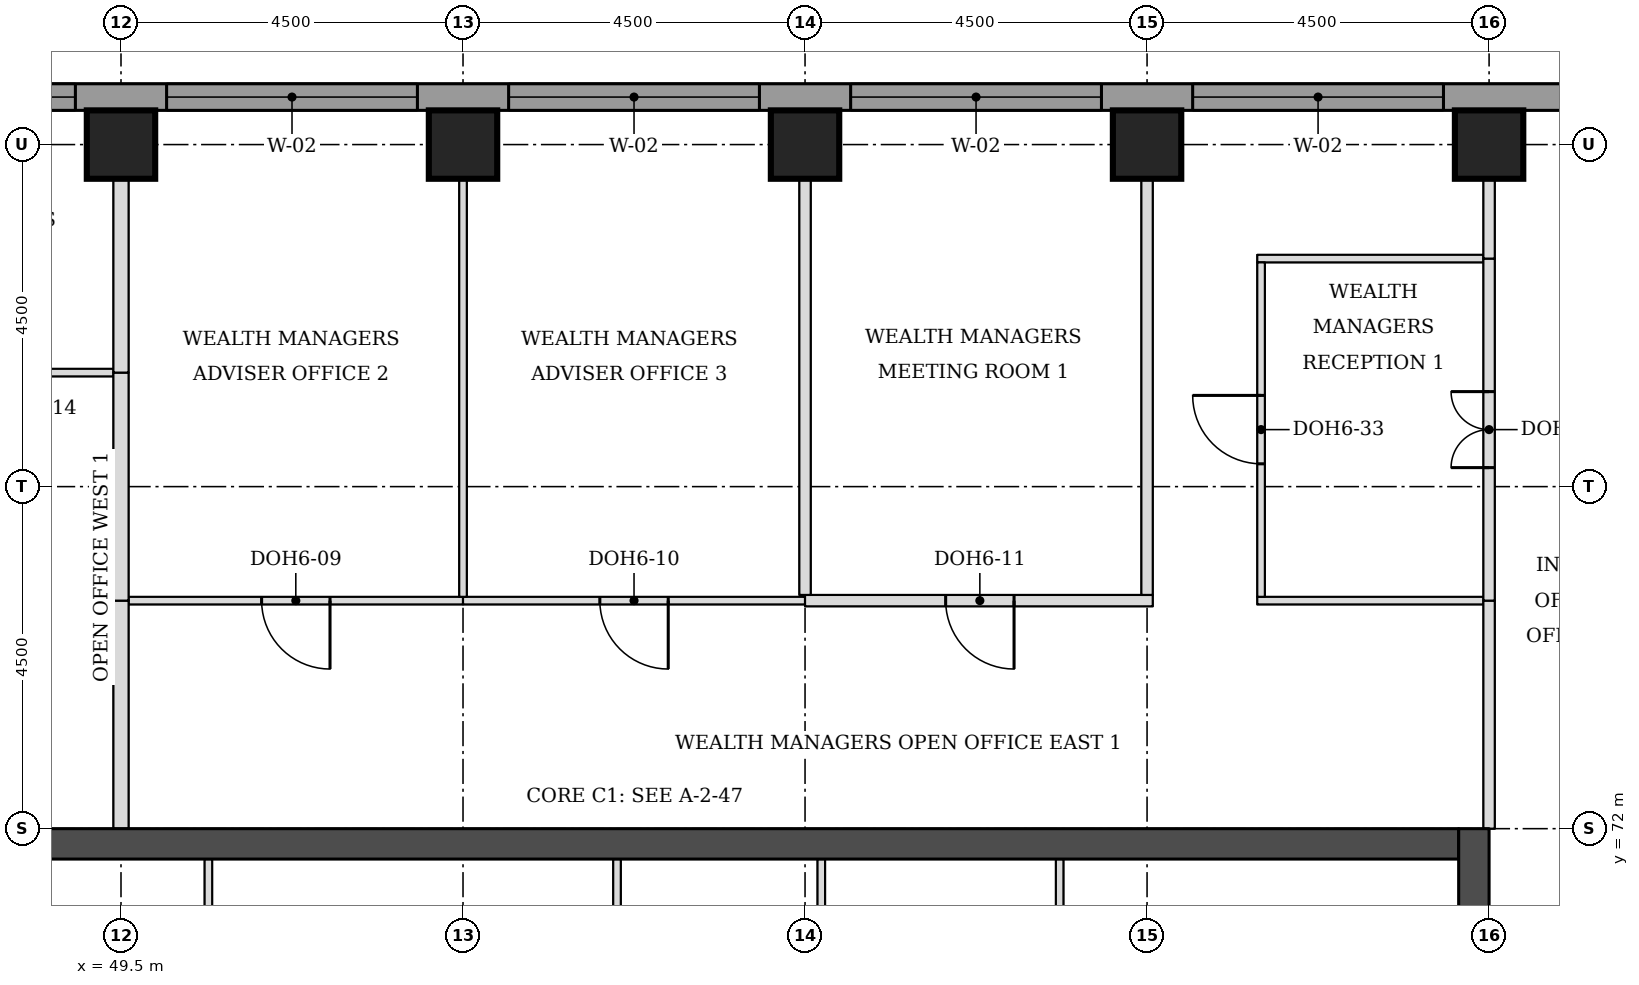
"""IFC4 building model, lengths in metres.
Left out: names, types, materials, properties, quantities, classifications, styles, units other than length and angle.
Written with IfcOpenShell. Run it as: python <this file> out.ifc"""

import sys

from ifc_helpers import new_model, si_unit, direction, frame, frame_2d, origin, origin_2d, place, context, subcontext, project, spatial, rectangle, extrude, element, fill, save


model = new_model("IFC4")
c1 = context("Model", 3, precision=1e-05, world=origin(), true_north=direction((0.0, 1.0)))
c2 = subcontext(c1, "Body", "Model", "MODEL_VIEW")
j1 = project(units=[si_unit("LENGTHUNIT", "METRE"), si_unit("PLANEANGLEUNIT", "RADIAN")], contexts=[c1])
p1 = place(None, origin())
s1 = spatial("IfcSite", under=j1, at=p1, CompositionType="ELEMENT")
p2 = place(p1, origin())
s2 = spatial("IfcBuilding", under=s1, at=p2, CompositionType="ELEMENT")
p3 = place(p2, frame((0.0, 0.0, 188.4)))
s3 = spatial("IfcBuildingStorey", under=s2, at=p3, CompositionType="ELEMENT", Elevation=188.4)
for number, where, z_axis, x_axis in (
    (1, (49.5, 81.0, 0.0), (0.0, 0.0, 1.0), (1.0, 0.0, 0.0)),
    (2, (54.0, 81.0, 0.0), (0.0, 0.0, 1.0), (1.0, 0.0, 0.0)),
    (3, (58.5, 81.0, 0.0), (0.0, 0.0, 1.0), (1.0, 0.0, 0.0)),
    (4, (63.0, 81.0, 0.0), (0.0, 0.0, 1.0), (1.0, 0.0, 0.0)),
    (5, (67.5, 81.0, 0.0), (0.0, 0.0, 1.0), (1.0, 0.0, 0.0)),
):
    element("IfcColumn", number, at=place(p3, frame(where, z_axis=z_axis, x_axis=x_axis)), inside=s3, PredefinedType="COLUMN", context=c2, shape_type="SweptSolid", body=[
        extrude(rectangle(XDim=0.9, YDim=0.9, at=origin_2d()), origin(), (0.0, 0.0, 1.0), 3.7),
    ])
p4 = place(p3, frame((45.4, 71.8, 0.0), z_axis=(0.0, 0.0, 1.0), x_axis=(1.0, 0.0, 0.0)))
e6 = element("IfcWall", 6, at=p4, inside=s3, PredefinedType="SHEAR", context=c2, shape_type="SweptSolid", body=[
    extrude(rectangle(XDim=21.7, YDim=0.4, at=frame_2d((10.85, 0.0))), origin(), (0.0, 0.0, 1.0), 3.7),
])
p5 = place(p3, frame((67.3, 49.5, 0.0), z_axis=(0.0, 0.0, 1.0), x_axis=(0.0, 1.0, 0.0)))
e7 = element("IfcWall", 7, at=p5, inside=s3, PredefinedType="SHEAR", context=c2, shape_type="SweptSolid", body=[
    extrude(rectangle(XDim=22.5, YDim=0.4, at=frame_2d((11.25, 0.0))), origin(), (0.0, 0.0, 1.0), 3.7),
])
p6 = place(p5, frame((4.2, 0.0, 0.0)))
e8 = element("IfcOpeningElement", 8, at=p6, cuts=e7, PredefinedType="OPENING", context=c2, shape_type="SweptSolid", body=[
    extrude(rectangle(XDim=1.8, YDim=2.1, at=frame_2d((0.9, 1.05))), frame((0.0, 0.21, 0.0), z_axis=(0.0, -1.0, 0.0), x_axis=(1.0, 0.0, 0.0)), (0.0, 0.0, 1.0), 0.42),
])
p7 = place(p5, frame((6.9, 0.0, 0.0)))
e9 = element("IfcOpeningElement", 9, at=p7, cuts=e7, PredefinedType="OPENING", context=c2, shape_type="SweptSolid", body=[
    extrude(rectangle(XDim=1.1, YDim=2.1, at=frame_2d((0.55, 1.05))), frame((0.0, 0.21, 0.0), z_axis=(0.0, -1.0, 0.0), x_axis=(1.0, 0.0, 0.0)), (0.0, 0.0, 1.0), 0.42),
])
p8 = place(p5, frame((13.6, 0.0, 0.0)))
e10 = element("IfcOpeningElement", 10, at=p8, cuts=e7, PredefinedType="OPENING", context=c2, shape_type="SweptSolid", body=[
    extrude(rectangle(XDim=1.1, YDim=2.1, at=frame_2d((0.55, 1.05))), frame((0.0, 0.21, 0.0), z_axis=(0.0, -1.0, 0.0), x_axis=(1.0, 0.0, 0.0)), (0.0, 0.0, 1.0), 0.42),
])
p9 = place(p5, frame((16.5, 0.0, 0.0)))
e11 = element("IfcOpeningElement", 11, at=p9, cuts=e7, PredefinedType="OPENING", context=c2, shape_type="SweptSolid", body=[
    extrude(rectangle(XDim=1.8, YDim=2.1, at=frame_2d((0.9, 1.05))), frame((0.0, 0.21, 0.0), z_axis=(0.0, -1.0, 0.0), x_axis=(1.0, 0.0, 0.0)), (0.0, 0.0, 1.0), 0.42),
])
p10 = place(p3, frame((72.331, 81.625, 0.0), z_axis=(0.0, 0.0, 1.0), x_axis=(-1.0, 0.0, 0.0)))
e12 = element("IfcWall", 12, at=p10, inside=s3, PredefinedType="STANDARD", context=c2, shape_type="SweptSolid", body=[
    extrude(rectangle(XDim=32.163, YDim=0.35, at=frame_2d((16.081, 0.0))), origin(), (0.0, 0.0, 1.0), 3.525),
])
p11 = place(p10, frame((5.431, 0.0, 0.9)))
e13 = element("IfcOpeningElement", 13, at=p11, cuts=e12, PredefinedType="OPENING", context=c2, shape_type="SweptSolid", body=[
    extrude(rectangle(XDim=3.3, YDim=1.9, at=frame_2d((1.65, 0.95))), frame((0.0, 0.185, 0.0), z_axis=(0.0, -1.0, 0.0), x_axis=(1.0, 0.0, 0.0)), (0.0, 0.0, 1.0), 0.37),
])
p12 = place(p10, frame((9.931, 0.0, 0.9)))
e14 = element("IfcOpeningElement", 14, at=p12, cuts=e12, PredefinedType="OPENING", context=c2, shape_type="SweptSolid", body=[
    extrude(rectangle(XDim=3.3, YDim=1.9, at=frame_2d((1.65, 0.95))), frame((0.0, 0.185, 0.0), z_axis=(0.0, -1.0, 0.0), x_axis=(1.0, 0.0, 0.0)), (0.0, 0.0, 1.0), 0.37),
])
p13 = place(p10, frame((14.431, 0.0, 0.9)))
e15 = element("IfcOpeningElement", 15, at=p13, cuts=e12, PredefinedType="OPENING", context=c2, shape_type="SweptSolid", body=[
    extrude(rectangle(XDim=3.3, YDim=1.9, at=frame_2d((1.65, 0.95))), frame((0.0, 0.185, 0.0), z_axis=(0.0, -1.0, 0.0), x_axis=(1.0, 0.0, 0.0)), (0.0, 0.0, 1.0), 0.37),
])
p14 = place(p10, frame((18.931, 0.0, 0.9)))
e16 = element("IfcOpeningElement", 16, at=p14, cuts=e12, PredefinedType="OPENING", context=c2, shape_type="SweptSolid", body=[
    extrude(rectangle(XDim=3.3, YDim=1.9, at=frame_2d((1.65, 0.95))), frame((0.0, 0.185, 0.0), z_axis=(0.0, -1.0, 0.0), x_axis=(1.0, 0.0, 0.0)), (0.0, 0.0, 1.0), 0.37),
])
p15 = place(p10, frame((23.431, 0.0, 0.9)))
e17 = element("IfcOpeningElement", 17, at=p15, cuts=e12, PredefinedType="OPENING", context=c2, shape_type="SweptSolid", body=[
    extrude(rectangle(XDim=3.3, YDim=1.9, at=frame_2d((1.65, 0.95))), frame((0.0, 0.185, 0.0), z_axis=(0.0, -1.0, 0.0), x_axis=(1.0, 0.0, 0.0)), (0.0, 0.0, 1.0), 0.37),
])
p16 = place(p3, frame((49.6, 75.0, 0.0), z_axis=(0.0, 0.0, 1.0), x_axis=(1.0, 0.0, 0.0)))
e18 = element("IfcWall", 18, at=p16, inside=s3, PredefinedType="PARTITIONING", context=c2, shape_type="SweptSolid", body=[
    extrude(rectangle(XDim=4.4, YDim=0.1, at=frame_2d((2.2, 0.0))), origin(), (0.0, 0.0, 1.0), 3.55),
])
p17 = place(p16, frame((1.75, 0.0, 0.0)))
e19 = element("IfcOpeningElement", 19, at=p17, cuts=e18, PredefinedType="OPENING", context=c2, shape_type="SweptSolid", body=[
    extrude(rectangle(XDim=0.9, YDim=2.1, at=frame_2d((0.45, 1.05))), frame((0.0, 0.06, 0.0), z_axis=(0.0, -1.0, 0.0), x_axis=(1.0, 0.0, 0.0)), (0.0, 0.0, 1.0), 0.12),
])
p18 = place(p3, frame((54.0, 75.0, 0.0), z_axis=(0.0, 0.0, 1.0), x_axis=(1.0, 0.0, 0.0)))
e20 = element("IfcWall", 20, at=p18, inside=s3, PredefinedType="PARTITIONING", context=c2, shape_type="SweptSolid", body=[
    extrude(rectangle(XDim=4.5, YDim=0.1, at=frame_2d((2.25, 0.0))), origin(), (0.0, 0.0, 1.0), 3.55),
])
p19 = place(p18, frame((1.8, 0.0, 0.0)))
e21 = element("IfcOpeningElement", 21, at=p19, cuts=e20, PredefinedType="OPENING", context=c2, shape_type="SweptSolid", body=[
    extrude(rectangle(XDim=0.9, YDim=2.1, at=frame_2d((0.45, 1.05))), frame((0.0, 0.06, 0.0), z_axis=(0.0, -1.0, 0.0), x_axis=(1.0, 0.0, 0.0)), (0.0, 0.0, 1.0), 0.12),
])
p20 = place(p3, frame((58.5, 75.0, 0.0), z_axis=(0.0, 0.0, 1.0), x_axis=(1.0, 0.0, 0.0)))
e22 = element("IfcWall", 22, at=p20, inside=s3, PredefinedType="PARTITIONING", context=c2, shape_type="SweptSolid", body=[
    extrude(rectangle(XDim=4.575, YDim=0.15, at=frame_2d((2.288, 0.0))), origin(), (0.0, 0.0, 1.0), 3.55),
])
p21 = place(p20, frame((1.85, 0.0, 0.0)))
e23 = element("IfcOpeningElement", 23, at=p21, cuts=e22, PredefinedType="OPENING", context=c2, shape_type="SweptSolid", body=[
    extrude(rectangle(XDim=0.9, YDim=2.1, at=frame_2d((0.45, 1.05))), frame((0.0, 0.085, 0.0), z_axis=(0.0, -1.0, 0.0), x_axis=(1.0, 0.0, 0.0)), (0.0, 0.0, 1.0), 0.17),
])
p22 = place(p3, frame((64.45, 75.0, 0.0), z_axis=(0.0, 0.0, 1.0), x_axis=(1.0, 0.0, 0.0)))
e24 = element("IfcWall", 24, at=p22, inside=s3, PredefinedType="PARTITIONING", context=c2, shape_type="SweptSolid", body=[
    extrude(rectangle(XDim=2.975, YDim=0.1, at=frame_2d((1.488, 0.0))), origin(), (0.0, 0.0, 1.0), 3.55),
])
p23 = place(p3, frame((45.075, 78.0, 0.0), z_axis=(0.0, 0.0, 1.0), x_axis=(1.0, 0.0, 0.0)))
e25 = element("IfcWall", 25, at=p23, inside=s3, PredefinedType="PARTITIONING", context=c2, shape_type="SweptSolid", body=[
    extrude(rectangle(XDim=4.325, YDim=0.1, at=frame_2d((2.163, 0.0))), origin(), (0.0, 0.0, 1.0), 3.55),
])
p24 = place(p23, frame((1.95, 0.0, 0.0)))
e26 = element("IfcOpeningElement", 26, at=p24, cuts=e25, PredefinedType="OPENING", context=c2, shape_type="SweptSolid", body=[
    extrude(rectangle(XDim=0.9, YDim=2.1, at=frame_2d((0.45, 1.05))), frame((0.0, 0.06, 0.0), z_axis=(0.0, -1.0, 0.0), x_axis=(1.0, 0.0, 0.0)), (0.0, 0.0, 1.0), 0.12),
])
p25 = place(p3, frame((64.45, 79.5, 0.0), z_axis=(0.0, 0.0, 1.0), x_axis=(1.0, 0.0, 0.0)))
e27 = element("IfcWall", 27, at=p25, inside=s3, PredefinedType="PARTITIONING", context=c2, shape_type="SweptSolid", body=[
    extrude(rectangle(XDim=2.975, YDim=0.1, at=frame_2d((1.488, 0.0))), origin(), (0.0, 0.0, 1.0), 3.55),
])
p26 = place(p3, frame((49.5, 72.0, 0.0), z_axis=(0.0, 0.0, 1.0), x_axis=(0.0, 1.0, 0.0)))
e28 = element("IfcWall", 28, at=p26, inside=s3, PredefinedType="PARTITIONING", context=c2, shape_type="SweptSolid", body=[
    extrude(rectangle(XDim=3.0, YDim=0.2, at=frame_2d((1.5, 0.0))), origin(), (0.0, 0.0, 1.0), 3.55),
])
p27 = place(p3, frame((67.5, 72.0, 0.0), z_axis=(0.0, 0.0, 1.0), x_axis=(0.0, 1.0, 0.0)))
e29 = element("IfcWall", 29, at=p27, inside=s3, PredefinedType="PARTITIONING", context=c2, shape_type="SweptSolid", body=[
    extrude(rectangle(XDim=3.0, YDim=0.15, at=frame_2d((1.5, 0.0))), origin(), (0.0, 0.0, 1.0), 3.022),
])
p28 = place(p3, frame((49.5, 75.0, 0.0), z_axis=(0.0, 0.0, 1.0), x_axis=(0.0, 1.0, 0.0)))
e30 = element("IfcWall", 30, at=p28, inside=s3, PredefinedType="PARTITIONING", context=c2, shape_type="SweptSolid", body=[
    extrude(rectangle(XDim=3.0, YDim=0.2, at=frame_2d((1.5, 0.0))), origin(), (0.0, 0.0, 1.0), 3.55),
])
p29 = place(p3, frame((67.5, 75.0, 0.0), z_axis=(0.0, 0.0, 1.0), x_axis=(0.0, 1.0, 0.0)))
e31 = element("IfcWall", 31, at=p29, inside=s3, PredefinedType="PARTITIONING", context=c2, shape_type="SweptSolid", body=[
    extrude(rectangle(XDim=4.5, YDim=0.15, at=frame_2d((2.25, 0.0))), origin(), (0.0, 0.0, 1.0), 3.022),
])
p30 = place(p29, frame((1.75, 0.0, 0.0)))
e32 = element("IfcOpeningElement", 32, at=p30, cuts=e31, PredefinedType="OPENING", context=c2, shape_type="SweptSolid", body=[
    extrude(rectangle(XDim=1.0, YDim=2.1, at=frame_2d((0.5, 1.05))), frame((0.0, 0.085, 0.0), z_axis=(0.0, -1.0, 0.0), x_axis=(1.0, 0.0, 0.0)), (0.0, 0.0, 1.0), 0.17),
])
p31 = place(p3, frame((54.0, 75.05, 0.0), z_axis=(0.0, 0.0, 1.0), x_axis=(0.0, 1.0, 0.0)))
e33 = element("IfcWall", 33, at=p31, inside=s3, PredefinedType="PARTITIONING", context=c2, shape_type="SweptSolid", body=[
    extrude(rectangle(XDim=6.4, YDim=0.1, at=frame_2d((3.2, 0.0))), origin(), (0.0, 0.0, 1.0), 3.55),
])
p32 = place(p3, frame((64.5, 75.05, 0.0), z_axis=(0.0, 0.0, 1.0), x_axis=(0.0, 1.0, 0.0)))
e34 = element("IfcWall", 34, at=p32, inside=s3, PredefinedType="PARTITIONING", context=c2, shape_type="SweptSolid", body=[
    extrude(rectangle(XDim=4.4, YDim=0.1, at=frame_2d((2.2, 0.0))), origin(), (0.0, 0.0, 1.0), 3.55),
])
p33 = place(p32, frame((1.75, 0.0, 0.0)))
e35 = element("IfcOpeningElement", 35, at=p33, cuts=e34, PredefinedType="OPENING", context=c2, shape_type="SweptSolid", body=[
    extrude(rectangle(XDim=0.9, YDim=2.1, at=frame_2d((0.45, 1.05))), frame((0.0, 0.06, 0.0), z_axis=(0.0, -1.0, 0.0), x_axis=(1.0, 0.0, 0.0)), (0.0, 0.0, 1.0), 0.12),
])
for number, where, z_axis, x_axis in (
    (36, (58.5, 75.075, 0.0), (0.0, 0.0, 1.0), (0.0, 1.0, 0.0)),
    (37, (63.0, 75.075, 0.0), (0.0, 0.0, 1.0), (0.0, 1.0, 0.0)),
):
    element("IfcWall", number, at=place(p3, frame(where, z_axis=z_axis, x_axis=x_axis)), inside=s3, PredefinedType="PARTITIONING", context=c2, shape_type="SweptSolid", body=[
        extrude(rectangle(XDim=6.375, YDim=0.15, at=frame_2d((3.188, 0.0))), origin(), (0.0, 0.0, 1.0), 3.55),
    ])
p34 = place(p3, frame((49.5, 78.0, 0.0), z_axis=(0.0, 0.0, 1.0), x_axis=(0.0, 1.0, 0.0)))
e38 = element("IfcWall", 38, at=p34, inside=s3, PredefinedType="PARTITIONING", context=c2, shape_type="SweptSolid", body=[
    extrude(rectangle(XDim=3.45, YDim=0.2, at=frame_2d((1.725, 0.0))), origin(), (0.0, 0.0, 1.0), 3.55),
])
p35 = place(p3, frame((67.5, 79.5, 0.0), z_axis=(0.0, 0.0, 1.0), x_axis=(0.0, 1.0, 0.0)))
e39 = element("IfcWall", 39, at=p35, inside=s3, PredefinedType="PARTITIONING", context=c2, shape_type="SweptSolid", body=[
    extrude(rectangle(XDim=1.95, YDim=0.15, at=frame_2d((0.975, 0.0))), origin(), (0.0, 0.0, 1.0), 3.022),
])
for number, where, z_axis, x_axis in (
    (40, (50.65, 68.5, 0.0), (0.0, 0.0, 1.0), (0.0, 1.0, 0.0)),
    (41, (56.026, 68.5, 0.0), (0.0, 0.0, 1.0), (0.0, 1.0, 0.0)),
    (42, (58.714, 68.5, 0.0), (0.0, 0.0, 1.0), (0.0, 1.0, 0.0)),
    (43, (61.85, 68.5, 0.0), (0.0, 0.0, 1.0), (0.0, 1.0, 0.0)),
):
    element("IfcWall", number, at=place(p3, frame(where, z_axis=z_axis, x_axis=x_axis)), inside=s3, PredefinedType="PARTITIONING", context=c2, shape_type="SweptSolid", body=[
        extrude(rectangle(XDim=3.1, YDim=0.1, at=frame_2d((1.55, 0.0))), origin(), (0.0, 0.0, 1.0), 3.55),
    ])
p36 = place(p11, origin())
e44 = element("IfcWindow", 44, at=p36, inside=s3, PartitioningType="SINGLE_PANEL", PredefinedType="WINDOW", context=c2, shape_type="SweptSolid", body=[
    extrude(rectangle(XDim=3.3, YDim=1.9, at=frame_2d((1.65, 0.95))), frame((0.0, 0.085, 0.0), z_axis=(0.0, -1.0, 0.0), x_axis=(1.0, 0.0, 0.0)), (0.0, 0.0, 1.0), 0.06),
])
fill(e13, e44)
p37 = place(p12, origin())
e45 = element("IfcWindow", 45, at=p37, inside=s3, PartitioningType="SINGLE_PANEL", PredefinedType="WINDOW", context=c2, shape_type="SweptSolid", body=[
    extrude(rectangle(XDim=3.3, YDim=1.9, at=frame_2d((1.65, 0.95))), frame((0.0, 0.085, 0.0), z_axis=(0.0, -1.0, 0.0), x_axis=(1.0, 0.0, 0.0)), (0.0, 0.0, 1.0), 0.06),
])
fill(e14, e45)
p38 = place(p13, origin())
e46 = element("IfcWindow", 46, at=p38, inside=s3, PartitioningType="SINGLE_PANEL", PredefinedType="WINDOW", context=c2, shape_type="SweptSolid", body=[
    extrude(rectangle(XDim=3.3, YDim=1.9, at=frame_2d((1.65, 0.95))), frame((0.0, 0.085, 0.0), z_axis=(0.0, -1.0, 0.0), x_axis=(1.0, 0.0, 0.0)), (0.0, 0.0, 1.0), 0.06),
])
fill(e15, e46)
p39 = place(p14, origin())
e47 = element("IfcWindow", 47, at=p39, inside=s3, PartitioningType="SINGLE_PANEL", PredefinedType="WINDOW", context=c2, shape_type="SweptSolid", body=[
    extrude(rectangle(XDim=3.3, YDim=1.9, at=frame_2d((1.65, 0.95))), frame((0.0, 0.085, 0.0), z_axis=(0.0, -1.0, 0.0), x_axis=(1.0, 0.0, 0.0)), (0.0, 0.0, 1.0), 0.06),
])
fill(e16, e47)
p40 = place(p15, origin())
e48 = element("IfcWindow", 48, at=p40, inside=s3, PartitioningType="SINGLE_PANEL", PredefinedType="WINDOW", context=c2, shape_type="SweptSolid", body=[
    extrude(rectangle(XDim=3.3, YDim=1.9, at=frame_2d((1.65, 0.95))), frame((0.0, 0.085, 0.0), z_axis=(0.0, -1.0, 0.0), x_axis=(1.0, 0.0, 0.0)), (0.0, 0.0, 1.0), 0.06),
])
fill(e17, e48)
p41 = place(p30, origin())
e49 = element("IfcDoor", 49, at=p41, inside=s3, OperationType="DOUBLE_DOOR_SINGLE_SWING", PredefinedType="DOOR", context=c2, shape_type="SweptSolid", body=[
    extrude(rectangle(XDim=1.0, YDim=2.1, at=frame_2d((0.5, 1.05))), frame((0.0, 0.025, 0.0), z_axis=(0.0, -1.0, 0.0), x_axis=(1.0, 0.0, 0.0)), (0.0, 0.0, 1.0), 0.05),
])
fill(e32, e49)
p42 = place(p33, origin())
e50 = element("IfcDoor", 50, at=p42, inside=s3, OperationType="SINGLE_SWING_RIGHT", PredefinedType="DOOR", context=c2, shape_type="SweptSolid", body=[
    extrude(rectangle(XDim=0.9, YDim=2.1, at=frame_2d((0.45, 1.05))), frame((0.0, 0.025, 0.0), z_axis=(0.0, -1.0, 0.0), x_axis=(1.0, 0.0, 0.0)), (0.0, 0.0, 1.0), 0.05),
])
fill(e35, e50)
p43 = place(p17, frame((0.9, 0.0, 0.0), z_axis=(0.0, 0.0, 1.0), x_axis=(-1.0, 0.0, 0.0)))
e51 = element("IfcDoor", 51, at=p43, inside=s3, OperationType="SINGLE_SWING_LEFT", PredefinedType="DOOR", context=c2, shape_type="SweptSolid", body=[
    extrude(rectangle(XDim=0.9, YDim=2.1, at=frame_2d((0.45, 1.05))), frame((0.0, 0.025, 0.0), z_axis=(0.0, -1.0, 0.0), x_axis=(1.0, 0.0, 0.0)), (0.0, 0.0, 1.0), 0.05),
])
fill(e19, e51)
p44 = place(p19, frame((0.9, 0.0, 0.0), z_axis=(0.0, 0.0, 1.0), x_axis=(-1.0, 0.0, 0.0)))
e52 = element("IfcDoor", 52, at=p44, inside=s3, OperationType="SINGLE_SWING_LEFT", PredefinedType="DOOR", context=c2, shape_type="SweptSolid", body=[
    extrude(rectangle(XDim=0.9, YDim=2.1, at=frame_2d((0.45, 1.05))), frame((0.0, 0.025, 0.0), z_axis=(0.0, -1.0, 0.0), x_axis=(1.0, 0.0, 0.0)), (0.0, 0.0, 1.0), 0.05),
])
fill(e21, e52)
p45 = place(p21, frame((0.9, 0.0, 0.0), z_axis=(0.0, 0.0, 1.0), x_axis=(-1.0, 0.0, 0.0)))
e53 = element("IfcDoor", 53, at=p45, inside=s3, OperationType="SINGLE_SWING_LEFT", PredefinedType="DOOR", context=c2, shape_type="SweptSolid", body=[
    extrude(rectangle(XDim=0.9, YDim=2.1, at=frame_2d((0.45, 1.05))), frame((0.0, 0.025, 0.0), z_axis=(0.0, -1.0, 0.0), x_axis=(1.0, 0.0, 0.0)), (0.0, 0.0, 1.0), 0.05),
])
fill(e23, e53)
save(model, sys.argv[1])
